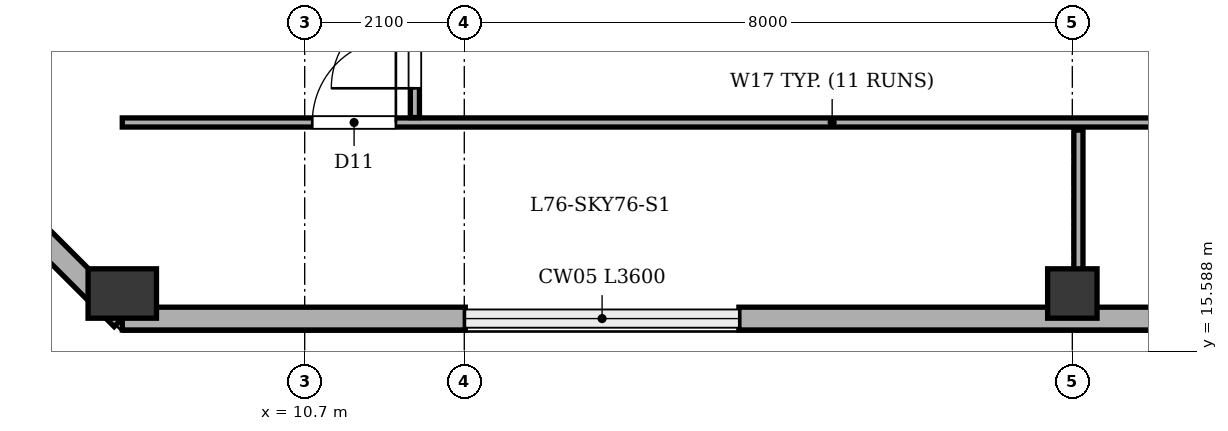
"""IFC4 building model, lengths in metres.
Left out: names, types, materials, properties, quantities, classifications, styles, units other than length and angle.
Written with IfcOpenShell. Run it as: python <this file> out.ifc"""

import sys

from ifc_helpers import new_model, si_unit, direction, frame, frame_2d, origin, origin_2d, place, context, subcontext, project, spatial, rectangle, extrude, element, fill, save


model = new_model("IFC4")
c1 = context("Model", 3, precision=1e-05, world=origin(), true_north=direction((0.0, 1.0)))
c2 = subcontext(c1, "Body", "Model", "MODEL_VIEW")
j1 = project(units=[si_unit("LENGTHUNIT", "METRE"), si_unit("PLANEANGLEUNIT", "RADIAN")], contexts=[c1])
p1 = place(None, origin())
s1 = spatial("IfcSite", under=j1, at=p1, CompositionType="ELEMENT")
p2 = place(p1, origin())
s2 = spatial("IfcBuilding", under=s1, at=p2, CompositionType="ELEMENT")
p3 = place(p2, frame((0.0, 0.0, 287.4)))
s3 = spatial("IfcBuildingStorey", under=s2, at=p3, CompositionType="ELEMENT", Elevation=287.4)
p4 = place(p3, frame((8.3, 16.35, 0.0), z_axis=(0.0, 0.0, 1.0), x_axis=(1.0, 0.0, 0.0)))
e1 = element("IfcColumn", 1, at=p4, inside=s3, PredefinedType="COLUMN", context=c2, shape_type="SweptSolid", body=[
    extrude(rectangle(XDim=0.65, YDim=0.9, at=origin_2d()), origin(), (0.0, 0.0, 1.0), 4.8),
])
p5 = place(p3, frame((20.8, 16.35, 0.0), z_axis=(0.0, 0.0, 1.0), x_axis=(1.0, 0.0, 0.0)))
e2 = element("IfcColumn", 2, at=p5, inside=s3, PredefinedType="COLUMN", context=c2, shape_type="SweptSolid", body=[
    extrude(rectangle(XDim=0.65, YDim=0.65, at=origin_2d()), origin(), (0.0, 0.0, 1.0), 4.8),
])
p6 = place(p3, frame((22.6, 16.02, 0.0), z_axis=(0.0, 0.0, 1.0), x_axis=(-1.0, 0.0, 0.0)))
e3 = element("IfcWall", 3, at=p6, inside=s3, PredefinedType="STANDARD", context=c2, shape_type="SweptSolid", body=[
    extrude(rectangle(XDim=6.187, YDim=0.3, at=frame_2d((3.094, 0.0))), origin(), (0.0, 0.0, 1.0), 3.735),
])
p7 = place(p3, frame((12.813, 16.02, 0.0), z_axis=(0.0, 0.0, 1.0), x_axis=(-1.0, 0.0, 0.0)))
e4 = element("IfcWall", 4, at=p7, inside=s3, PredefinedType="STANDARD", context=c2, shape_type="SweptSolid", body=[
    extrude(rectangle(XDim=4.513, YDim=0.3, at=frame_2d((2.256, 0.0))), origin(), (0.0, 0.0, 1.0), 3.735),
])
p8 = place(p3, frame((8.3, 16.02, 0.0), z_axis=(0.0, 0.0, 1.0), x_axis=(-0.707106781187, 0.707106781187, 0.0)))
e5 = element("IfcWall", 5, at=p8, inside=s3, PredefinedType="STANDARD", context=c2, shape_type="SweptSolid", body=[
    extrude(rectangle(XDim=5.417, YDim=0.3, at=frame_2d((2.708, 0.0))), origin(), (0.0, 0.0, 1.0), 3.735),
])
p9 = place(p3, frame((8.3, 18.6, 0.0), z_axis=(0.0, 0.0, 1.0), x_axis=(1.0, 0.0, 0.0)))
e6 = element("IfcWall", 6, at=p9, inside=s3, PredefinedType="PARTITIONING", context=c2, shape_type="SweptSolid", body=[
    extrude(rectangle(XDim=37.0, YDim=0.12, at=frame_2d((18.5, 0.0))), origin(), (0.0, 0.0, 1.0), 4.35),
])
p10 = place(p9, frame((2.5, 0.0, 0.0)))
e7 = element("IfcOpeningElement", 7, at=p10, cuts=e6, PredefinedType="OPENING", context=c2, shape_type="SweptSolid", body=[
    extrude(rectangle(XDim=1.1, YDim=2.15, at=frame_2d((0.55, 1.075))), frame((0.0, 0.07, 0.0), z_axis=(0.0, -1.0, 0.0), x_axis=(1.0, 0.0, 0.0)), (0.0, 0.0, 1.0), 0.14),
])
p11 = place(p9, frame((15.08, 0.0, 0.0)))
e8 = element("IfcOpeningElement", 8, at=p11, cuts=e6, PredefinedType="OPENING", context=c2, shape_type="SweptSolid", body=[
    extrude(rectangle(XDim=1.1, YDim=2.15, at=frame_2d((0.55, 1.075))), frame((0.0, 0.07, 0.0), z_axis=(0.0, -1.0, 0.0), x_axis=(1.0, 0.0, 0.0)), (0.0, 0.0, 1.0), 0.14),
])
p12 = place(p9, frame((27.66, 0.0, 0.0)))
e9 = element("IfcOpeningElement", 9, at=p12, cuts=e6, PredefinedType="OPENING", context=c2, shape_type="SweptSolid", body=[
    extrude(rectangle(XDim=1.1, YDim=2.15, at=frame_2d((0.55, 1.075))), frame((0.0, 0.07, 0.0), z_axis=(0.0, -1.0, 0.0), x_axis=(1.0, 0.0, 0.0)), (0.0, 0.0, 1.0), 0.14),
])
p13 = place(p3, frame((20.88, 16.175, 0.0), z_axis=(0.0, 0.0, 1.0), x_axis=(0.0, 1.0, 0.0)))
e10 = element("IfcWall", 10, at=p13, inside=s3, PredefinedType="PARTITIONING", context=c2, shape_type="SweptSolid", body=[
    extrude(rectangle(XDim=2.325, YDim=0.12, at=frame_2d((1.163, 0.0))), origin(), (0.0, 0.0, 1.0), 3.535),
])
p14 = place(p3, frame((12.15, 18.665, 0.0), z_axis=(0.0, 0.0, 1.0), x_axis=(0.0, 1.0, 0.0)))
e11 = element("IfcWall", 11, at=p14, inside=s3, PredefinedType="PARTITIONING", context=c2, shape_type="SweptSolid", body=[
    extrude(rectangle(XDim=17.47, YDim=0.12, at=frame_2d((8.735, 0.0))), origin(), (0.0, 0.0, 1.0), 4.35),
])
p15 = place(p14, frame((0.385, 0.0, 0.0)))
e12 = element("IfcOpeningElement", 12, at=p15, cuts=e11, PredefinedType="OPENING", context=c2, shape_type="SweptSolid", body=[
    extrude(rectangle(XDim=1.1, YDim=2.15, at=frame_2d((0.55, 1.075))), frame((0.0, 0.07, 0.0), z_axis=(0.0, -1.0, 0.0), x_axis=(1.0, 0.0, 0.0)), (0.0, 0.0, 1.0), 0.14),
])
p16 = place(p10, origin())
e13 = element("IfcDoor", 13, at=p16, inside=s3, OperationType="SINGLE_SWING_RIGHT", PredefinedType="DOOR", context=c2, shape_type="SweptSolid", body=[
    extrude(rectangle(XDim=1.1, YDim=2.15, at=frame_2d((0.55, 1.075))), frame((0.0, 0.025, 0.0), z_axis=(0.0, -1.0, 0.0), x_axis=(1.0, 0.0, 0.0)), (0.0, 0.0, 1.0), 0.05),
])
fill(e7, e13)
p17 = place(p15, origin())
e14 = element("IfcDoor", 14, at=p17, inside=s3, OperationType="SINGLE_SWING_LEFT", PredefinedType="DOOR", context=c2, shape_type="SweptSolid", body=[
    extrude(rectangle(XDim=1.1, YDim=2.15, at=frame_2d((0.55, 1.075))), frame((0.0, 0.025, 0.0), z_axis=(0.0, -1.0, 0.0), x_axis=(1.0, 0.0, 0.0)), (0.0, 0.0, 1.0), 0.05),
])
fill(e12, e14)
save(model, sys.argv[1])
